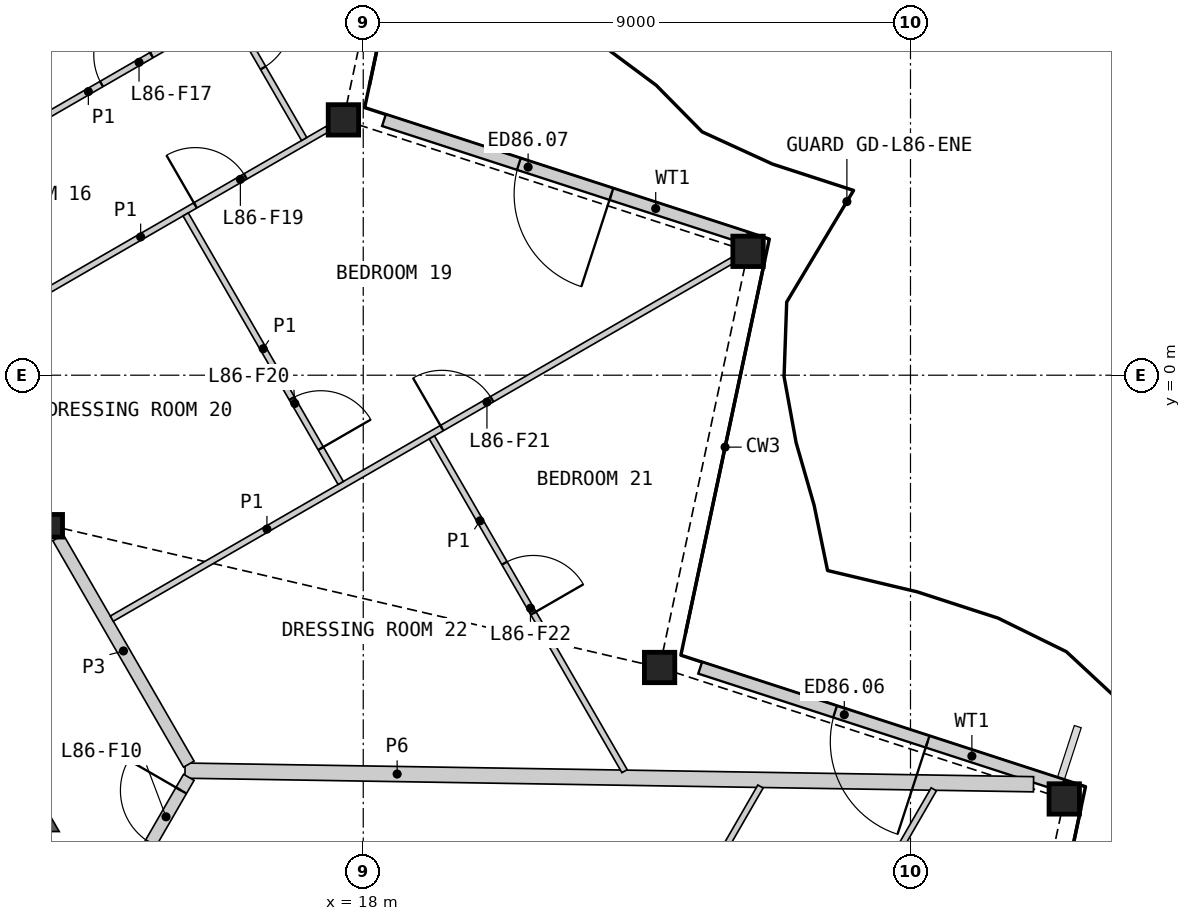
"""IFC4 building model, lengths in metres.
Left out: names, types, materials, properties, quantities, classifications, styles, units other than length and angle.
Written with IfcOpenShell. Run it as: python <this file> out.ifc"""

import sys

from ifc_helpers import new_model, si_unit, direction, frame, frame_2d, origin, origin_2d, place, context, subcontext, project, spatial, polyline, rectangle, hollow_rectangle, i_section, outline, extrude, element, fill, save


model = new_model("IFC4")
c1 = context("Model", 3, precision=1e-05, world=origin(), true_north=direction((0.0, 1.0)))
c2 = subcontext(c1, "Body", "Model", "MODEL_VIEW")
j1 = project(units=[si_unit("LENGTHUNIT", "METRE"), si_unit("PLANEANGLEUNIT", "RADIAN")], contexts=[c1])
p1 = place(None, origin())
s1 = spatial("IfcSite", under=j1, at=p1, CompositionType="ELEMENT")
p2 = place(p1, origin())
s2 = spatial("IfcBuilding", under=s1, at=p2, CompositionType="ELEMENT")
p3 = place(p2, frame((0.0, 0.0, 381.4)))
s3 = spatial("IfcBuildingStorey", under=s2, at=p3, CompositionType="ELEMENT", Elevation=381.4)
for number, where, z_axis, x_axis in (
    (1, (29.529, -6.969, 0.0), (0.0, 0.0, 1.0), (1.0, 0.0, 0.0)),
    (2, (22.874, -4.807, 0.0), (0.0, 0.0, 1.0), (1.0, 0.0, 0.0)),
    (3, (24.329, 2.037, 0.0), (0.0, 0.0, 1.0), (1.0, 0.0, 0.0)),
    (4, (17.674, 4.199, 0.0), (0.0, 0.0, 1.0), (1.0, 0.0, 0.0)),
):
    element("IfcColumn", number, at=place(p3, frame(where, z_axis=z_axis, x_axis=x_axis)), inside=s3, PredefinedType="COLUMN", context=c2, shape_type="SweptSolid", body=[
        extrude(hollow_rectangle(XDim=0.5, YDim=0.5, WallThickness=0.03, at=origin_2d()), origin(), (0.0, 0.0, 1.0), 3.4),
    ])
p4 = place(p3, frame((12.868, -2.476, 0.0), z_axis=(0.0, 0.0, 1.0), x_axis=(1.0, 0.0, 0.0)))
e5 = element("IfcColumn", 5, at=p4, inside=s3, PredefinedType="COLUMN", context=c2, shape_type="SweptSolid", body=[
    extrude(i_section(OverallWidth=0.374, OverallDepth=0.372, WebThickness=0.016, FlangeThickness=0.026, at=origin_2d()), origin(), (0.0, 0.0, 1.0), 3.4),
])
p5 = place(p3, frame((29.5, -6.75, 0.0), z_axis=(0.0, 0.0, 1.0), x_axis=(-0.951060123915, 0.309005891041, 0.0)))
e6 = element("IfcWall", 6, at=p5, inside=s3, PredefinedType="SOLIDWALL", context=c2, shape_type="SweptSolid", body=[
    extrude(rectangle(XDim=6.265, YDim=0.2, at=frame_2d((3.133, 0.0))), origin(), (0.0, 0.0, 1.0), 2.634),
])
p6 = place(p5, frame((2.333, 0.0, 0.0)))
e7 = element("IfcOpeningElement", 7, at=p6, cuts=e6, PredefinedType="OPENING", context=c2, shape_type="SweptSolid", body=[
    extrude(rectangle(XDim=1.6, YDim=2.25, at=frame_2d((0.8, 1.125))), frame((0.0, 0.11, 0.0), z_axis=(0.0, -1.0, 0.0), x_axis=(1.0, 0.0, 0.0)), (0.0, 0.0, 1.0), 0.22),
])
p7 = place(p3, frame((24.3, 2.257, 0.0), z_axis=(0.0, 0.0, 1.0), x_axis=(-0.951060123915, 0.309005891041, 0.0)))
e8 = element("IfcWall", 8, at=p7, inside=s3, PredefinedType="SOLIDWALL", context=c2, shape_type="SweptSolid", body=[
    extrude(rectangle(XDim=6.265, YDim=0.2, at=frame_2d((3.133, 0.0))), origin(), (0.0, 0.0, 1.0), 2.634),
])
p8 = place(p7, frame((2.333, 0.0, 0.0)))
e9 = element("IfcOpeningElement", 9, at=p8, cuts=e8, PredefinedType="OPENING", context=c2, shape_type="SweptSolid", body=[
    extrude(rectangle(XDim=1.6, YDim=2.25, at=frame_2d((0.8, 1.125))), frame((0.0, 0.11, 0.0), z_axis=(0.0, -1.0, 0.0), x_axis=(1.0, 0.0, 0.0)), (0.0, 0.0, 1.0), 0.22),
])
p9 = place(p3, origin())
e10 = element("IfcWall", 10, at=p9, inside=s3, PredefinedType="SHEAR", context=c2, shape_type="SweptSolid", body=[
    extrude(outline(polyline([(11.961, -7.506), (11.961, -6.906), (12.48, -6.606), (13.0, -7.506), (11.961, -7.506)])), origin(), (0.0, 0.0, 1.0), 3.1),
])
p10 = place(p3, frame((15.069, -6.503, 0.0), z_axis=(0.0, 0.0, 1.0), x_axis=(0.999870484296, -0.016093931549, 0.0)))
e11 = element("IfcWall", 11, at=p10, inside=s3, PredefinedType="PARTITIONING", context=c2, shape_type="SweptSolid", body=[
    extrude(rectangle(XDim=13.956, YDim=0.25, at=frame_2d((6.978, 0.0))), origin(), (0.0, 0.0, 1.0), 2.33),
])
p11 = place(p3, frame((12.981, -2.673, 0.0), z_axis=(0.0, 0.0, 1.0), x_axis=(0.499986217557, -0.866033360935, 0.0)))
e12 = element("IfcWall", 12, at=p11, inside=s3, PredefinedType="PARTITIONING", context=c2, shape_type="SweptSolid", body=[
    extrude(rectangle(XDim=4.3, YDim=0.2, at=frame_2d((2.15, 0.0))), origin(), (0.0, 0.0, 1.0), 3.1),
])
p12 = place(p3, frame((13.281, -9.819, 0.0), z_axis=(0.0, 0.0, 1.0), x_axis=(0.499948957823, 0.866054870994, 0.0)))
e13 = element("IfcWall", 13, at=p12, inside=s3, PredefinedType="PARTITIONING", context=c2, shape_type="SweptSolid", body=[
    extrude(rectangle(XDim=3.701, YDim=0.2, at=frame_2d((1.851, 0.0))), origin(), (0.0, 0.0, 1.0), 3.1),
])
p13 = place(p12, frame((2.451, 0.0, 0.0)))
e14 = element("IfcOpeningElement", 14, at=p13, cuts=e13, PredefinedType="OPENING", context=c2, shape_type="SweptSolid", body=[
    extrude(rectangle(XDim=1.0, YDim=2.1, at=frame_2d((0.5, 1.05))), frame((0.0, 0.11, 0.0), z_axis=(0.0, -1.0, 0.0), x_axis=(1.0, 0.0, 0.0)), (0.0, 0.0, 1.0), 0.22),
])
p14 = place(p3, frame((8.775, 5.066, 0.0), z_axis=(0.0, 0.0, 1.0), x_axis=(0.866023724155, 0.500002909193, 0.0)))
e15 = element("IfcWall", 15, at=p14, inside=s3, PredefinedType="PARTITIONING", context=c2, shape_type="SweptSolid", body=[
    extrude(rectangle(XDim=11.655, YDim=0.2, at=frame_2d((5.827, 0.0))), origin(), (0.0, 0.0, 1.0), 2.33),
])
p15 = place(p3, frame((13.865, -4.004, 0.0), z_axis=(0.0, 0.0, 1.0), x_axis=(0.866023404247, 0.500003463284, 0.0)))
e16 = element("IfcWall", 16, at=p15, inside=s3, PredefinedType="PARTITIONING", context=c2, shape_type="SweptSolid", body=[
    extrude(rectangle(XDim=11.782, YDim=0.1, at=frame_2d((5.891, 0.0))), origin(), (0.0, 0.0, 1.0), 2.33),
])
p16 = place(p15, frame((6.269, 0.0, 0.0)))
e17 = element("IfcOpeningElement", 17, at=p16, cuts=e16, PredefinedType="OPENING", context=c2, shape_type="SweptSolid", body=[
    extrude(rectangle(XDim=0.95, YDim=2.1, at=frame_2d((0.475, 1.05))), frame((0.0, 0.06, 0.0), z_axis=(0.0, -1.0, 0.0), x_axis=(1.0, 0.0, 0.0)), (0.0, 0.0, 1.0), 0.12),
])
p17 = place(p3, frame((23.512, -13.517, 0.0), z_axis=(0.0, 0.0, 1.0), x_axis=(0.49998445949, 0.866034375916, 0.0)))
e18 = element("IfcWall", 18, at=p17, inside=s3, PredefinedType="PARTITIONING", context=c2, shape_type="SweptSolid", body=[
    extrude(rectangle(XDim=7.743, YDim=0.1, at=frame_2d((3.872, 0.0))), origin(), (0.0, 0.0, 1.0), 2.33),
])
p18 = place(p17, frame((3.397, 0.0, 0.0)))
e19 = element("IfcOpeningElement", 19, at=p18, cuts=e18, PredefinedType="OPENING", context=c2, shape_type="SweptSolid", body=[
    extrude(rectangle(XDim=0.95, YDim=2.1, at=frame_2d((0.475, 1.05))), frame((0.0, 0.06, 0.0), z_axis=(0.0, -1.0, 0.0), x_axis=(1.0, 0.0, 0.0)), (0.0, 0.0, 1.0), 0.12),
])
p19 = place(p3, frame((11.265, 0.5, 0.0), z_axis=(0.0, 0.0, 1.0), x_axis=(0.866033839264, 0.499985389037, 0.0)))
e20 = element("IfcWall", 20, at=p19, inside=s3, PredefinedType="PARTITIONING", context=c2, shape_type="SweptSolid", body=[
    extrude(rectangle(XDim=7.1, YDim=0.1, at=frame_2d((3.55, 0.0))), origin(), (0.0, 0.0, 1.0), 2.33),
])
p20 = place(p19, frame((4.588, 0.0, 0.0)))
e21 = element("IfcOpeningElement", 21, at=p20, cuts=e20, PredefinedType="OPENING", context=c2, shape_type="SweptSolid", body=[
    extrude(rectangle(XDim=0.95, YDim=2.1, at=frame_2d((0.475, 1.05))), frame((0.0, 0.06, 0.0), z_axis=(0.0, -1.0, 0.0), x_axis=(1.0, 0.0, 0.0)), (0.0, 0.0, 1.0), 0.12),
])
p21 = place(p3, frame((21.354, -12.271, 0.0), z_axis=(0.0, 0.0, 1.0), x_axis=(0.499983931063, 0.866034680991, 0.0)))
e22 = element("IfcWall", 22, at=p21, inside=s3, PredefinedType="PARTITIONING", context=c2, shape_type="SweptSolid", body=[
    extrude(rectangle(XDim=6.358, YDim=0.1, at=frame_2d((3.179, 0.0))), origin(), (0.0, 0.0, 1.0), 2.33),
])
p22 = place(p21, frame((1.252, 0.0, 0.0)))
e23 = element("IfcOpeningElement", 23, at=p22, cuts=e22, PredefinedType="OPENING", context=c2, shape_type="SweptSolid", body=[
    extrude(rectangle(XDim=0.95, YDim=2.1, at=frame_2d((0.475, 1.05))), frame((0.0, 0.06, 0.0), z_axis=(0.0, -1.0, 0.0), x_axis=(1.0, 0.0, 0.0)), (0.0, 0.0, 1.0), 0.12),
])
p23 = place(p3, frame((19.128, -1.023, 0.0), z_axis=(0.0, 0.0, 1.0), x_axis=(0.499991387631, -0.866030376081, 0.0)))
e24 = element("IfcWall", 24, at=p23, inside=s3, PredefinedType="PARTITIONING", context=c2, shape_type="SweptSolid", body=[
    extrude(rectangle(XDim=6.339, YDim=0.1, at=frame_2d((3.169, 0.0))), origin(), (0.0, 0.0, 1.0), 2.33),
])
p24 = place(p23, frame((2.389, 0.0, 0.0)))
e25 = element("IfcOpeningElement", 25, at=p24, cuts=e24, PredefinedType="OPENING", context=c2, shape_type="SweptSolid", body=[
    extrude(rectangle(XDim=0.95, YDim=2.1, at=frame_2d((0.475, 1.05))), frame((0.0, 0.06, 0.0), z_axis=(0.0, -1.0, 0.0), x_axis=(1.0, 0.0, 0.0)), (0.0, 0.0, 1.0), 0.12),
])
p25 = place(p3, frame((15.08, 2.644, 0.0), z_axis=(0.0, 0.0, 1.0), x_axis=(0.500005610874, -0.86602216432, 0.0)))
e26 = element("IfcWall", 26, at=p25, inside=s3, PredefinedType="PARTITIONING", context=c2, shape_type="SweptSolid", body=[
    extrude(rectangle(XDim=5.1, YDim=0.1, at=frame_2d((2.55, 0.0))), origin(), (0.0, 0.0, 1.0), 2.33),
])
p26 = place(p25, frame((3.494, 0.0, 0.0)))
e27 = element("IfcOpeningElement", 27, at=p26, cuts=e26, PredefinedType="OPENING", context=c2, shape_type="SweptSolid", body=[
    extrude(rectangle(XDim=0.95, YDim=2.1, at=frame_2d((0.475, 1.05))), frame((0.0, 0.06, 0.0), z_axis=(0.0, -1.0, 0.0), x_axis=(1.0, 0.0, 0.0)), (0.0, 0.0, 1.0), 0.12),
])
p27 = place(p3, frame((14.503, 8.258, 0.0), z_axis=(0.0, 0.0, 1.0), x_axis=(0.500012591307, -0.866018134068, 0.0)))
e28 = element("IfcWall", 28, at=p27, inside=s3, PredefinedType="PARTITIONING", context=c2, shape_type="SweptSolid", body=[
    extrude(rectangle(XDim=5.05, YDim=0.1, at=frame_2d((2.525, 0.0))), origin(), (0.0, 0.0, 1.0), 2.33),
])
p28 = place(p27, frame((2.75, 0.0, 0.0)))
e29 = element("IfcOpeningElement", 29, at=p28, cuts=e28, PredefinedType="OPENING", context=c2, shape_type="SweptSolid", body=[
    extrude(rectangle(XDim=0.95, YDim=2.1, at=frame_2d((0.475, 1.05))), frame((0.0, 0.06, 0.0), z_axis=(0.0, -1.0, 0.0), x_axis=(1.0, 0.0, 0.0)), (0.0, 0.0, 1.0), 0.12),
])
p29 = place(p3, frame((12.223, 3.939, 0.0), z_axis=(0.0, 0.0, 1.0), x_axis=(0.866032775405, 0.499987231761, 0.0)))
e30 = element("IfcWall", 30, at=p29, inside=s3, PredefinedType="PARTITIONING", context=c2, shape_type="SweptSolid", body=[
    extrude(rectangle(XDim=2.9, YDim=0.1, at=frame_2d((1.45, 0.0))), origin(), (0.0, 0.0, 1.0), 2.33),
])
p30 = place(p29, frame((1.7, 0.0, 0.0)))
e31 = element("IfcOpeningElement", 31, at=p30, cuts=e30, PredefinedType="OPENING", context=c2, shape_type="SweptSolid", body=[
    extrude(rectangle(XDim=0.95, YDim=2.1, at=frame_2d((0.475, 1.05))), frame((0.0, 0.06, 0.0), z_axis=(0.0, -1.0, 0.0), x_axis=(1.0, 0.0, 0.0)), (0.0, 0.0, 1.0), 0.12),
])
p31 = place(p6, origin())
e32 = element("IfcDoor", 32, at=p31, inside=s3, OperationType="DOUBLE_DOOR_SINGLE_SWING", PredefinedType="DOOR", context=c2, shape_type="SweptSolid", body=[
    extrude(rectangle(XDim=1.6, YDim=2.25, at=frame_2d((0.8, 1.125))), frame((0.0, 0.025, 0.0), z_axis=(0.0, -1.0, 0.0), x_axis=(1.0, 0.0, 0.0)), (0.0, 0.0, 1.0), 0.05),
])
fill(e7, e32)
p32 = place(p8, origin())
e33 = element("IfcDoor", 33, at=p32, inside=s3, OperationType="DOUBLE_DOOR_SINGLE_SWING", PredefinedType="DOOR", context=c2, shape_type="SweptSolid", body=[
    extrude(rectangle(XDim=1.6, YDim=2.25, at=frame_2d((0.8, 1.125))), frame((0.0, 0.025, 0.0), z_axis=(0.0, -1.0, 0.0), x_axis=(1.0, 0.0, 0.0)), (0.0, 0.0, 1.0), 0.05),
])
fill(e9, e33)
p33 = place(p13, origin())
e34 = element("IfcDoor", 34, at=p33, inside=s3, OperationType="SINGLE_SWING_RIGHT", PredefinedType="DOOR", context=c2, shape_type="SweptSolid", body=[
    extrude(rectangle(XDim=1.0, YDim=2.1, at=frame_2d((0.5, 1.05))), frame((0.0, 0.025, 0.0), z_axis=(0.0, -1.0, 0.0), x_axis=(1.0, 0.0, 0.0)), (0.0, 0.0, 1.0), 0.05),
])
fill(e14, e34)
p34 = place(p30, origin())
e35 = element("IfcDoor", 35, at=p34, inside=s3, OperationType="SINGLE_SWING_RIGHT", PredefinedType="DOOR", context=c2, shape_type="SweptSolid", body=[
    extrude(rectangle(XDim=0.95, YDim=2.1, at=frame_2d((0.475, 1.05))), frame((0.0, 0.025, 0.0), z_axis=(0.0, -1.0, 0.0), x_axis=(1.0, 0.0, 0.0)), (0.0, 0.0, 1.0), 0.05),
])
fill(e31, e35)
p35 = place(p28, origin())
e36 = element("IfcDoor", 36, at=p35, inside=s3, OperationType="SINGLE_SWING_LEFT", PredefinedType="DOOR", context=c2, shape_type="SweptSolid", body=[
    extrude(rectangle(XDim=0.95, YDim=2.1, at=frame_2d((0.475, 1.05))), frame((0.0, 0.025, 0.0), z_axis=(0.0, -1.0, 0.0), x_axis=(1.0, 0.0, 0.0)), (0.0, 0.0, 1.0), 0.05),
])
fill(e29, e36)
p36 = place(p20, origin())
e37 = element("IfcDoor", 37, at=p36, inside=s3, OperationType="SINGLE_SWING_LEFT", PredefinedType="DOOR", context=c2, shape_type="SweptSolid", body=[
    extrude(rectangle(XDim=0.95, YDim=2.1, at=frame_2d((0.475, 1.05))), frame((0.0, 0.025, 0.0), z_axis=(0.0, -1.0, 0.0), x_axis=(1.0, 0.0, 0.0)), (0.0, 0.0, 1.0), 0.05),
])
fill(e21, e37)
p37 = place(p26, origin())
e38 = element("IfcDoor", 38, at=p37, inside=s3, OperationType="SINGLE_SWING_RIGHT", PredefinedType="DOOR", context=c2, shape_type="SweptSolid", body=[
    extrude(rectangle(XDim=0.95, YDim=2.1, at=frame_2d((0.475, 1.05))), frame((0.0, 0.025, 0.0), z_axis=(0.0, -1.0, 0.0), x_axis=(1.0, 0.0, 0.0)), (0.0, 0.0, 1.0), 0.05),
])
fill(e27, e38)
p38 = place(p16, origin())
e39 = element("IfcDoor", 39, at=p38, inside=s3, OperationType="SINGLE_SWING_LEFT", PredefinedType="DOOR", context=c2, shape_type="SweptSolid", body=[
    extrude(rectangle(XDim=0.95, YDim=2.1, at=frame_2d((0.475, 1.05))), frame((0.0, 0.025, 0.0), z_axis=(0.0, -1.0, 0.0), x_axis=(1.0, 0.0, 0.0)), (0.0, 0.0, 1.0), 0.05),
])
fill(e17, e39)
p39 = place(p24, origin())
e40 = element("IfcDoor", 40, at=p39, inside=s3, OperationType="SINGLE_SWING_RIGHT", PredefinedType="DOOR", context=c2, shape_type="SweptSolid", body=[
    extrude(rectangle(XDim=0.95, YDim=2.1, at=frame_2d((0.475, 1.05))), frame((0.0, 0.025, 0.0), z_axis=(0.0, -1.0, 0.0), x_axis=(1.0, 0.0, 0.0)), (0.0, 0.0, 1.0), 0.05),
])
fill(e25, e40)
save(model, sys.argv[1])
